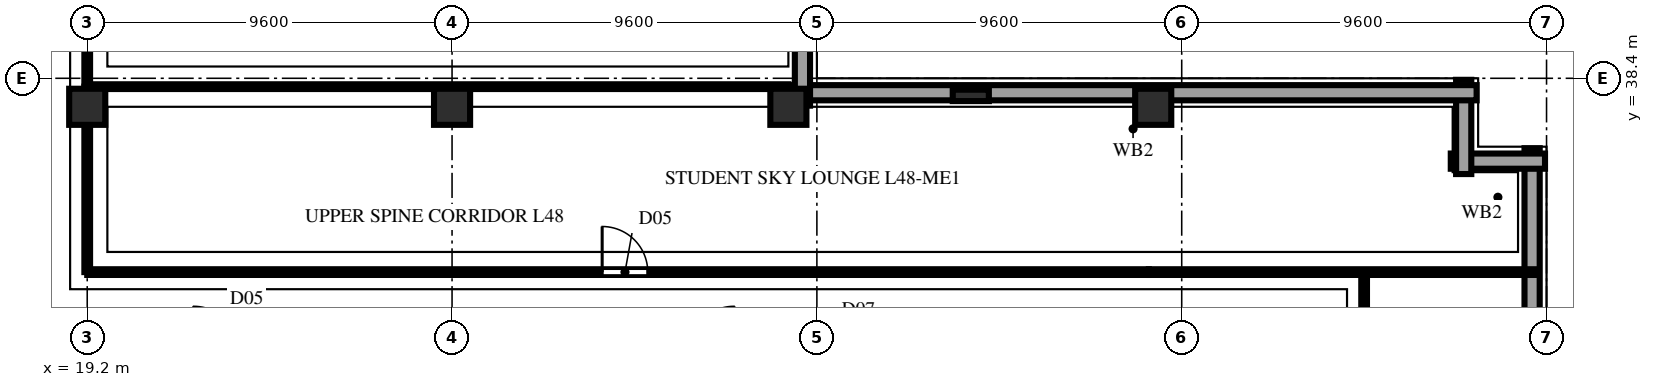
"""IFC4 building model, lengths in metres.
Left out: names, types, materials, properties, quantities, classifications, styles, units other than length and angle.
Written with IfcOpenShell. Run it as: python <this file> out.ifc"""

import sys

from ifc_helpers import new_model, si_unit, direction, frame, frame_2d, origin, origin_2d, place, context, subcontext, project, spatial, rectangle, extrude, element, fill, save


model = new_model("IFC4")
c1 = context("Model", 3, precision=1e-05, world=origin(), true_north=direction((0.0, 1.0)))
c2 = subcontext(c1, "Body", "Model", "MODEL_VIEW")
j1 = project(units=[si_unit("LENGTHUNIT", "METRE"), si_unit("PLANEANGLEUNIT", "RADIAN")], contexts=[c1])
p1 = place(None, origin())
s1 = spatial("IfcSite", under=j1, at=p1, CompositionType="ELEMENT")
p2 = place(p1, origin())
s2 = spatial("IfcBuilding", under=s1, at=p2, CompositionType="ELEMENT")
p3 = place(p2, frame((0.0, 0.0, 190.2)))
s3 = spatial("IfcBuildingStorey", under=s2, at=p3, CompositionType="ELEMENT", Elevation=190.2)
for number, where, z_axis, x_axis in (
    (1, (19.2, 37.65, 0.0), (0.0, 0.0, 1.0), (1.0, 0.0, 0.0)),
    (2, (28.8, 37.65, 0.0), (0.0, 0.0, 1.0), (1.0, 0.0, 0.0)),
    (3, (37.65, 37.65, 0.0), (0.0, 0.0, 1.0), (1.0, 0.0, 0.0)),
    (4, (47.25, 37.65, 0.0), (0.0, 0.0, 1.0), (1.0, 0.0, 0.0)),
):
    element("IfcColumn", number, at=place(p3, frame(where, z_axis=z_axis, x_axis=x_axis)), inside=s3, PredefinedType="COLUMN", context=c2, shape_type="SweptSolid", body=[
        extrude(rectangle(XDim=0.95, YDim=0.95, at=origin_2d()), origin(), (0.0, 0.0, 1.0), 3.8),
    ])
p4 = place(p3, frame((42.45, 37.95, 0.0), z_axis=(0.0, 0.0, 1.0), x_axis=(1.0, 0.0, 0.0)))
e5 = element("IfcColumn", 5, at=p4, inside=s3, PredefinedType="PILASTER", context=c2, shape_type="SweptSolid", body=[
    extrude(rectangle(XDim=0.95, YDim=0.3, at=origin_2d()), origin(), (0.0, 0.0, 1.0), 3.8),
])
p5 = place(p3, frame((57.22, 1.84, 0.0), z_axis=(0.0, 0.0, 1.0), x_axis=(0.0, 1.0, 0.0)))
e6 = element("IfcWall", 6, at=p5, inside=s3, PredefinedType="SOLIDWALL", context=c2, shape_type="SweptSolid", body=[
    extrude(rectangle(XDim=34.72, YDim=0.4, at=frame_2d((17.36, 0.0))), origin(), (0.0, 0.0, 1.0), 3.48),
])
p6 = place(p5, frame((4.46, 0.0, 0.85)))
e7 = element("IfcOpeningElement", 7, at=p6, cuts=e6, PredefinedType="OPENING", context=c2, shape_type="SweptSolid", body=[
    extrude(rectangle(XDim=1.8, YDim=1.85, at=frame_2d((0.9, 0.925))), frame((0.0, 0.212, 0.0), z_axis=(0.0, -1.0, 0.0), x_axis=(1.0, 0.0, 0.0)), (0.0, 0.0, 1.0), 0.424),
])
p7 = place(p5, frame((9.26, 0.0, 0.85)))
e8 = element("IfcOpeningElement", 8, at=p7, cuts=e6, PredefinedType="OPENING", context=c2, shape_type="SweptSolid", body=[
    extrude(rectangle(XDim=1.8, YDim=1.85, at=frame_2d((0.9, 0.925))), frame((0.0, 0.212, 0.0), z_axis=(0.0, -1.0, 0.0), x_axis=(1.0, 0.0, 0.0)), (0.0, 0.0, 1.0), 0.424),
])
p8 = place(p5, frame((14.06, 0.0, 0.85)))
e9 = element("IfcOpeningElement", 9, at=p8, cuts=e6, PredefinedType="OPENING", context=c2, shape_type="SweptSolid", body=[
    extrude(rectangle(XDim=1.8, YDim=1.85, at=frame_2d((0.9, 0.925))), frame((0.0, 0.212, 0.0), z_axis=(0.0, -1.0, 0.0), x_axis=(1.0, 0.0, 0.0)), (0.0, 0.0, 1.0), 0.424),
])
p9 = place(p5, frame((18.86, 0.0, 0.85)))
e10 = element("IfcOpeningElement", 10, at=p9, cuts=e6, PredefinedType="OPENING", context=c2, shape_type="SweptSolid", body=[
    extrude(rectangle(XDim=1.8, YDim=1.85, at=frame_2d((0.9, 0.925))), frame((0.0, 0.212, 0.0), z_axis=(0.0, -1.0, 0.0), x_axis=(1.0, 0.0, 0.0)), (0.0, 0.0, 1.0), 0.424),
])
p10 = place(p5, frame((23.66, 0.0, 0.85)))
e11 = element("IfcOpeningElement", 11, at=p10, cuts=e6, PredefinedType="OPENING", context=c2, shape_type="SweptSolid", body=[
    extrude(rectangle(XDim=1.8, YDim=1.85, at=frame_2d((0.9, 0.925))), frame((0.0, 0.212, 0.0), z_axis=(0.0, -1.0, 0.0), x_axis=(1.0, 0.0, 0.0)), (0.0, 0.0, 1.0), 0.424),
])
p11 = place(p3, frame((57.56, 36.22, 0.0), z_axis=(0.0, 0.0, 1.0), x_axis=(-1.0, 0.0, 0.0)))
e12 = element("IfcWall", 12, at=p11, inside=s3, PredefinedType="SOLIDWALL", context=c2, shape_type="SweptSolid", body=[
    extrude(rectangle(XDim=2.48, YDim=0.4, at=frame_2d((1.24, 0.0))), origin(), (0.0, 0.0, 1.0), 3.48),
])
p12 = place(p3, frame((55.42, 35.88, 0.0), z_axis=(0.0, 0.0, 1.0), x_axis=(0.0, 1.0, 0.0)))
e13 = element("IfcWall", 13, at=p12, inside=s3, PredefinedType="SOLIDWALL", context=c2, shape_type="SweptSolid", body=[
    extrude(rectangle(XDim=2.48, YDim=0.4, at=frame_2d((1.24, 0.0))), origin(), (0.0, 0.0, 1.0), 3.48),
])
p13 = place(p3, frame((55.76, 38.02, 0.0), z_axis=(0.0, 0.0, 1.0), x_axis=(-1.0, 0.0, 0.0)))
e14 = element("IfcWall", 14, at=p13, inside=s3, PredefinedType="SOLIDWALL", context=c2, shape_type="SweptSolid", body=[
    extrude(rectangle(XDim=18.08, YDim=0.4, at=frame_2d((9.04, 0.0))), origin(), (0.0, 0.0, 1.0), 3.48),
])
p14 = place(p3, frame((38.02, 37.68, 0.0), z_axis=(0.0, 0.0, 1.0), x_axis=(0.0, 1.0, 0.0)))
e15 = element("IfcWall", 15, at=p14, inside=s3, PredefinedType="SOLIDWALL", context=c2, shape_type="SweptSolid", body=[
    extrude(rectangle(XDim=27.68, YDim=0.4, at=frame_2d((13.84, 0.0))), origin(), (0.0, 0.0, 1.0), 3.48),
])
p15 = place(p3, frame((52.8, 31.2, 0.0), z_axis=(0.0, 0.0, 1.0), x_axis=(0.0, 1.0, 0.0)))
e16 = element("IfcWall", 16, at=p15, inside=s3, PredefinedType="PARTITIONING", context=c2, shape_type="SweptSolid", body=[
    extrude(rectangle(XDim=2.1, YDim=0.15, at=frame_2d((1.05, 0.0))), origin(), (0.0, 0.0, 1.0), 3.48),
])
p16 = place(p3, frame((19.2, 33.3, 0.0), z_axis=(0.0, 0.0, 1.0), x_axis=(1.0, 0.0, 0.0)))
e17 = element("IfcWall", 17, at=p16, inside=s3, PredefinedType="PARTITIONING", context=c2, shape_type="SweptSolid", body=[
    extrude(rectangle(XDim=27.935, YDim=0.15, at=frame_2d((13.968, 0.0))), origin(), (0.0, 0.0, 1.0), 3.023),
])
p17 = place(p16, frame((13.55, 0.0, 0.0)))
e18 = element("IfcOpeningElement", 18, at=p17, cuts=e17, PredefinedType="OPENING", context=c2, shape_type="SweptSolid", body=[
    extrude(rectangle(XDim=1.2, YDim=2.2, at=frame_2d((0.6, 1.1))), frame((0.0, 0.087, 0.0), z_axis=(0.0, -1.0, 0.0), x_axis=(1.0, 0.0, 0.0)), (0.0, 0.0, 1.0), 0.174),
])
p18 = place(p3, frame((47.135, 33.3, 0.0), z_axis=(0.0, 0.0, 1.0), x_axis=(1.0, 0.0, 0.0)))
e19 = element("IfcWall", 19, at=p18, inside=s3, PredefinedType="PARTITIONING", context=c2, shape_type="SweptSolid", body=[
    extrude(rectangle(XDim=10.245, YDim=0.15, at=frame_2d((5.123, 0.0))), origin(), (0.0, 0.0, 1.0), 3.48),
])
p19 = place(p3, frame((19.2, 33.3, 0.0), z_axis=(0.0, 0.0, 1.0), x_axis=(0.0, 1.0, 0.0)))
e20 = element("IfcWall", 20, at=p19, inside=s3, PredefinedType="PARTITIONING", context=c2, shape_type="SweptSolid", body=[
    extrude(rectangle(XDim=4.88, YDim=0.15, at=frame_2d((2.44, 0.0))), origin(), (0.0, 0.0, 1.0), 2.863),
])
p20 = place(p3, frame((19.28, 38.18, 0.0), z_axis=(0.0, 0.0, 1.0), x_axis=(1.0, 0.0, 0.0)))
e21 = element("IfcWall", 21, at=p20, inside=s3, PredefinedType="PARTITIONING", context=c2, shape_type="SweptSolid", body=[
    extrude(rectangle(XDim=18.37, YDim=0.125, at=frame_2d((9.185, 0.0))), origin(), (0.0, 0.0, 1.0), 3.48),
])
p21 = place(p3, frame((19.2, 38.18, 0.0), z_axis=(0.0, 0.0, 1.0), x_axis=(0.0, 1.0, 0.0)))
e22 = element("IfcWall", 22, at=p21, inside=s3, PredefinedType="PARTITIONING", context=c2, shape_type="SweptSolid", body=[
    extrude(rectangle(XDim=10.07, YDim=0.15, at=frame_2d((5.035, 0.0))), origin(), (0.0, 0.0, 1.0), 2.863),
])
p22 = place(p21, frame((3.6, 0.0, 0.0)))
e23 = element("IfcOpeningElement", 23, at=p22, cuts=e22, PredefinedType="OPENING", context=c2, shape_type="SweptSolid", body=[
    extrude(rectangle(XDim=1.2, YDim=2.2, at=frame_2d((0.6, 1.1))), frame((0.0, 0.087, 0.0), z_axis=(0.0, -1.0, 0.0), x_axis=(1.0, 0.0, 0.0)), (0.0, 0.0, 1.0), 0.174),
])
p23 = place(p17, origin())
e24 = element("IfcDoor", 24, at=p23, inside=s3, OperationType="SINGLE_SWING_LEFT", PredefinedType="DOOR", context=c2, shape_type="SweptSolid", body=[
    extrude(rectangle(XDim=1.2, YDim=2.2, at=frame_2d((0.6, 1.1))), frame((0.0, 0.025, 0.0), z_axis=(0.0, -1.0, 0.0), x_axis=(1.0, 0.0, 0.0)), (0.0, 0.0, 1.0), 0.05),
])
fill(e18, e24)
save(model, sys.argv[1])
